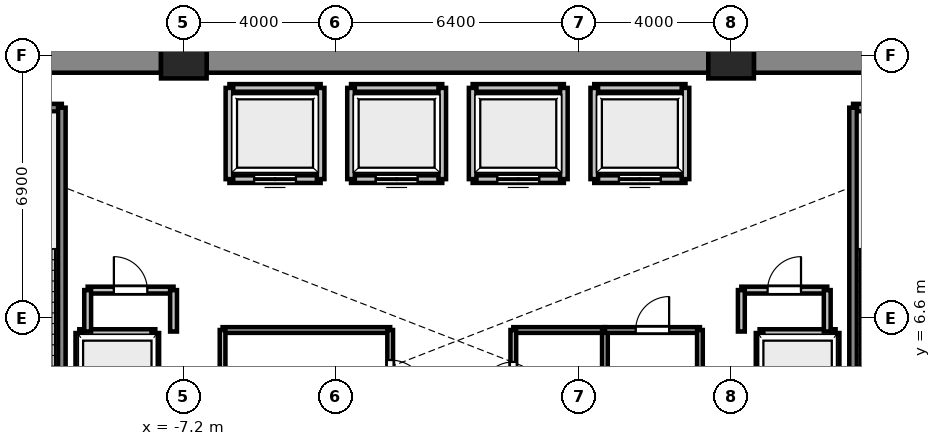
"""IFC4 building model, lengths in metres.
Left out: names, types, materials, properties, quantities, classifications, styles, units other than length and angle.
Written with IfcOpenShell. Run it as: python <this file> out.ifc"""

import sys

from ifc_helpers import new_model, si_unit, direction, frame, frame_2d, origin, origin_2d, place, context, subcontext, project, spatial, rectangle, extrude, source, transform, mapped, element, fill, save


model = new_model("IFC4")
c1 = context("Model", 3, precision=1e-05, world=origin(), true_north=direction((0.0, 1.0)))
c2 = subcontext(c1, "Body", "Model", "MODEL_VIEW")
j1 = project(units=[si_unit("LENGTHUNIT", "METRE"), si_unit("PLANEANGLEUNIT", "RADIAN")], contexts=[c1])
p1 = place(None, origin())
s1 = spatial("IfcSite", under=j1, at=p1, CompositionType="ELEMENT")
p2 = place(p1, origin())
s2 = spatial("IfcBuilding", under=s1, at=p2, CompositionType="ELEMENT")
p3 = place(p2, frame((0.0, 0.0, -13.2)))
s3 = spatial("IfcBuildingStorey", under=s2, at=p3, CompositionType="ELEMENT", Elevation=-13.2)
for number, where, z_axis, x_axis in (
    (1, (-7.2, 13.5, 0.0), (0.0, 0.0, 1.0), (1.0, 0.0, 0.0)),
    (2, (7.2, 13.5, 0.0), (0.0, 0.0, 1.0), (1.0, 0.0, 0.0)),
):
    element("IfcColumn", number, at=place(p3, frame(where, z_axis=z_axis, x_axis=x_axis)), inside=s3, PredefinedType="COLUMN", context=c2, shape_type="SweptSolid", body=[
        extrude(rectangle(XDim=1.2, YDim=1.2, at=origin_2d()), origin(), (0.0, 0.0, 1.0), 4.4),
    ])
p4 = place(p3, frame((-13.8, 13.5, 0.0), z_axis=(0.0, 0.0, 1.0), x_axis=(1.0, 0.0, 0.0)))
e3 = element("IfcWall", 3, at=p4, inside=s3, PredefinedType="SHEAR", context=c2, shape_type="SweptSolid", body=[
    extrude(rectangle(XDim=6.0, YDim=0.9, at=frame_2d((3.0, 0.0))), origin(), (0.0, 0.0, 1.0), 4.12),
])
p5 = place(p3, frame((-6.6, 13.5, 0.0), z_axis=(0.0, 0.0, 1.0), x_axis=(1.0, 0.0, 0.0)))
e4 = element("IfcWall", 4, at=p5, inside=s3, PredefinedType="SHEAR", context=c2, shape_type="SweptSolid", body=[
    extrude(rectangle(XDim=13.2, YDim=0.9, at=frame_2d((6.6, 0.0))), origin(), (0.0, 0.0, 1.0), 4.12),
])
p6 = place(p3, frame((7.8, 13.5, 0.0), z_axis=(0.0, 0.0, 1.0), x_axis=(1.0, 0.0, 0.0)))
e5 = element("IfcWall", 5, at=p6, inside=s3, PredefinedType="SHEAR", context=c2, shape_type="SweptSolid", body=[
    extrude(rectangle(XDim=6.0, YDim=0.9, at=frame_2d((3.0, 0.0))), origin(), (0.0, 0.0, 1.0), 4.12),
])
p7 = place(p3, frame((-9.95, 6.2, 0.0), z_axis=(0.0, 0.0, 1.0), x_axis=(1.0, 0.0, 0.0)))
e6 = element("IfcWall", 6, at=p7, inside=s3, PredefinedType="SOLIDWALL", context=c2, shape_type="SweptSolid", body=[
    extrude(rectangle(XDim=2.0, YDim=0.2, at=frame_2d((1.0, 0.0))), origin(), (0.0, 0.0, 1.0), 4.12),
])
for number, where, z_axis, x_axis in (
    (7, (-9.95, 3.4, 0.0), (0.0, 0.0, 1.0), (0.0, 1.0, 0.0)),
    (8, (-7.95, 6.2, 0.0), (0.0, 0.0, 1.0), (0.0, -1.0, 0.0)),
):
    element("IfcWall", number, at=place(p3, frame(where, z_axis=z_axis, x_axis=x_axis)), inside=s3, PredefinedType="SOLIDWALL", context=c2, shape_type="SweptSolid", body=[
        extrude(rectangle(XDim=2.8, YDim=0.2, at=frame_2d((1.4, 0.0))), origin(), (0.0, 0.0, 1.0), 4.12),
    ])
p8 = place(p3, frame((7.95, 6.2, 0.0), z_axis=(0.0, 0.0, 1.0), x_axis=(1.0, 0.0, 0.0)))
e9 = element("IfcWall", 9, at=p8, inside=s3, PredefinedType="SOLIDWALL", context=c2, shape_type="SweptSolid", body=[
    extrude(rectangle(XDim=2.0, YDim=0.2, at=frame_2d((1.0, 0.0))), origin(), (0.0, 0.0, 1.0), 4.12),
])
for number, where, z_axis, x_axis in (
    (10, (7.95, 3.4, 0.0), (0.0, 0.0, 1.0), (0.0, 1.0, 0.0)),
    (11, (9.95, 6.2, 0.0), (0.0, 0.0, 1.0), (0.0, -1.0, 0.0)),
):
    element("IfcWall", number, at=place(p3, frame(where, z_axis=z_axis, x_axis=x_axis)), inside=s3, PredefinedType="SOLIDWALL", context=c2, shape_type="SweptSolid", body=[
        extrude(rectangle(XDim=2.8, YDim=0.2, at=frame_2d((1.4, 0.0))), origin(), (0.0, 0.0, 1.0), 4.12),
    ])
p9 = place(p3, frame((-3.6, 10.25, 0.0), z_axis=(0.0, 0.0, 1.0), x_axis=(-1.0, 0.0, 0.0)))
e12 = element("IfcWall", 12, at=p9, inside=s3, PredefinedType="SOLIDWALL", context=c2, shape_type="SweptSolid", body=[
    extrude(rectangle(XDim=2.4, YDim=0.2, at=frame_2d((1.2, 0.0))), origin(), (0.0, 0.0, 1.0), 4.12),
])
p10 = place(p9, frame((0.65, 0.0, 0.0)))
e13 = element("IfcOpeningElement", 13, at=p10, cuts=e12, PredefinedType="OPENING", context=c2, shape_type="SweptSolid", body=[
    extrude(rectangle(XDim=1.1, YDim=2.2, at=frame_2d((0.55, 1.1))), frame((0.0, 0.11, 0.0), z_axis=(0.0, -1.0, 0.0), x_axis=(1.0, 0.0, 0.0)), (0.0, 0.0, 1.0), 0.22),
])
for number, where, z_axis, x_axis in (
    (14, (-6.0, 12.65, 0.0), (0.0, 0.0, 1.0), (1.0, 0.0, 0.0)),
    (15, (-6.0, 10.25, 0.0), (0.0, 0.0, 1.0), (0.0, 1.0, 0.0)),
    (16, (-3.6, 12.65, 0.0), (0.0, 0.0, 1.0), (0.0, -1.0, 0.0)),
):
    element("IfcWall", number, at=place(p3, frame(where, z_axis=z_axis, x_axis=x_axis)), inside=s3, PredefinedType="SOLIDWALL", context=c2, shape_type="SweptSolid", body=[
        extrude(rectangle(XDim=2.4, YDim=0.2, at=frame_2d((1.2, 0.0))), origin(), (0.0, 0.0, 1.0), 4.12),
    ])
p11 = place(p3, frame((-0.4, 10.25, 0.0), z_axis=(0.0, 0.0, 1.0), x_axis=(-1.0, 0.0, 0.0)))
e17 = element("IfcWall", 17, at=p11, inside=s3, PredefinedType="SOLIDWALL", context=c2, shape_type="SweptSolid", body=[
    extrude(rectangle(XDim=2.4, YDim=0.2, at=frame_2d((1.2, 0.0))), origin(), (0.0, 0.0, 1.0), 4.12),
])
p12 = place(p11, frame((0.65, 0.0, 0.0)))
e18 = element("IfcOpeningElement", 18, at=p12, cuts=e17, PredefinedType="OPENING", context=c2, shape_type="SweptSolid", body=[
    extrude(rectangle(XDim=1.1, YDim=2.2, at=frame_2d((0.55, 1.1))), frame((0.0, 0.11, 0.0), z_axis=(0.0, -1.0, 0.0), x_axis=(1.0, 0.0, 0.0)), (0.0, 0.0, 1.0), 0.22),
])
p13 = place(p3, frame((-2.8, 12.65, 0.0), z_axis=(0.0, 0.0, 1.0), x_axis=(1.0, 0.0, 0.0)))
e19 = element("IfcWall", 19, at=p13, inside=s3, PredefinedType="SOLIDWALL", context=c2, shape_type="SweptSolid", body=[
    extrude(rectangle(XDim=2.4, YDim=0.2, at=frame_2d((1.2, 0.0))), origin(), (0.0, 0.0, 1.0), 4.12),
])
for number, where, z_axis, x_axis in (
    (20, (-2.8, 10.25, 0.0), (0.0, 0.0, 1.0), (0.0, 1.0, 0.0)),
    (21, (-0.4, 12.65, 0.0), (0.0, 0.0, 1.0), (0.0, -1.0, 0.0)),
):
    element("IfcWall", number, at=place(p3, frame(where, z_axis=z_axis, x_axis=x_axis)), inside=s3, PredefinedType="SOLIDWALL", context=c2, shape_type="SweptSolid", body=[
        extrude(rectangle(XDim=2.4, YDim=0.2, at=frame_2d((1.2, 0.0))), origin(), (0.0, 0.0, 1.0), 4.12),
    ])
p14 = place(p3, frame((2.8, 10.25, 0.0), z_axis=(0.0, 0.0, 1.0), x_axis=(-1.0, 0.0, 0.0)))
e22 = element("IfcWall", 22, at=p14, inside=s3, PredefinedType="SOLIDWALL", context=c2, shape_type="SweptSolid", body=[
    extrude(rectangle(XDim=2.4, YDim=0.2, at=frame_2d((1.2, 0.0))), origin(), (0.0, 0.0, 1.0), 4.12),
])
p15 = place(p14, frame((0.65, 0.0, 0.0)))
e23 = element("IfcOpeningElement", 23, at=p15, cuts=e22, PredefinedType="OPENING", context=c2, shape_type="SweptSolid", body=[
    extrude(rectangle(XDim=1.1, YDim=2.2, at=frame_2d((0.55, 1.1))), frame((0.0, 0.11, 0.0), z_axis=(0.0, -1.0, 0.0), x_axis=(1.0, 0.0, 0.0)), (0.0, 0.0, 1.0), 0.22),
])
p16 = place(p3, frame((0.4, 12.65, 0.0), z_axis=(0.0, 0.0, 1.0), x_axis=(1.0, 0.0, 0.0)))
e24 = element("IfcWall", 24, at=p16, inside=s3, PredefinedType="SOLIDWALL", context=c2, shape_type="SweptSolid", body=[
    extrude(rectangle(XDim=2.4, YDim=0.2, at=frame_2d((1.2, 0.0))), origin(), (0.0, 0.0, 1.0), 4.12),
])
for number, where, z_axis, x_axis in (
    (25, (0.4, 10.25, 0.0), (0.0, 0.0, 1.0), (0.0, 1.0, 0.0)),
    (26, (2.8, 12.65, 0.0), (0.0, 0.0, 1.0), (0.0, -1.0, 0.0)),
):
    element("IfcWall", number, at=place(p3, frame(where, z_axis=z_axis, x_axis=x_axis)), inside=s3, PredefinedType="SOLIDWALL", context=c2, shape_type="SweptSolid", body=[
        extrude(rectangle(XDim=2.4, YDim=0.2, at=frame_2d((1.2, 0.0))), origin(), (0.0, 0.0, 1.0), 4.12),
    ])
p17 = place(p3, frame((6.0, 10.25, 0.0), z_axis=(0.0, 0.0, 1.0), x_axis=(-1.0, 0.0, 0.0)))
e27 = element("IfcWall", 27, at=p17, inside=s3, PredefinedType="SOLIDWALL", context=c2, shape_type="SweptSolid", body=[
    extrude(rectangle(XDim=2.4, YDim=0.2, at=frame_2d((1.2, 0.0))), origin(), (0.0, 0.0, 1.0), 4.12),
])
p18 = place(p17, frame((0.65, 0.0, 0.0)))
e28 = element("IfcOpeningElement", 28, at=p18, cuts=e27, PredefinedType="OPENING", context=c2, shape_type="SweptSolid", body=[
    extrude(rectangle(XDim=1.1, YDim=2.2, at=frame_2d((0.55, 1.1))), frame((0.0, 0.11, 0.0), z_axis=(0.0, -1.0, 0.0), x_axis=(1.0, 0.0, 0.0)), (0.0, 0.0, 1.0), 0.22),
])
for number, where, z_axis, x_axis in (
    (29, (3.6, 12.65, 0.0), (0.0, 0.0, 1.0), (1.0, 0.0, 0.0)),
    (30, (3.6, 10.25, 0.0), (0.0, 0.0, 1.0), (0.0, 1.0, 0.0)),
    (31, (6.0, 12.65, 0.0), (0.0, 0.0, 1.0), (0.0, -1.0, 0.0)),
):
    element("IfcWall", number, at=place(p3, frame(where, z_axis=z_axis, x_axis=x_axis)), inside=s3, PredefinedType="SOLIDWALL", context=c2, shape_type="SweptSolid", body=[
        extrude(rectangle(XDim=2.4, YDim=0.2, at=frame_2d((1.2, 0.0))), origin(), (0.0, 0.0, 1.0), 4.12),
    ])
p19 = place(p3, frame((-13.93, 12.13, 0.0), z_axis=(0.0, 0.0, 1.0), x_axis=(1.0, 0.0, 0.0)))
e32 = element("IfcWall", 32, at=p19, inside=s3, PredefinedType="SOLIDWALL", context=c2, shape_type="SweptSolid", body=[
    extrude(rectangle(XDim=3.52, YDim=0.2, at=frame_2d((1.76, 0.0))), origin(), (0.0, 0.0, 1.0), 4.12),
])
p20 = place(p3, frame((-10.41, 12.13, 0.0), z_axis=(0.0, 0.0, 1.0), x_axis=(0.0, -1.0, 0.0)))
e33 = element("IfcWall", 33, at=p20, inside=s3, PredefinedType="SOLIDWALL", context=c2, shape_type="SweptSolid", body=[
    extrude(rectangle(XDim=8.84, YDim=0.2, at=frame_2d((4.42, 0.0))), origin(), (0.0, 0.0, 1.0), 4.12),
])
p21 = place(p3, frame((10.41, 12.13, 0.0), z_axis=(0.0, 0.0, 1.0), x_axis=(1.0, 0.0, 0.0)))
e34 = element("IfcWall", 34, at=p21, inside=s3, PredefinedType="SOLIDWALL", context=c2, shape_type="SweptSolid", body=[
    extrude(rectangle(XDim=3.52, YDim=0.2, at=frame_2d((1.76, 0.0))), origin(), (0.0, 0.0, 1.0), 4.12),
])
p22 = place(p3, frame((10.41, 3.29, 0.0), z_axis=(0.0, 0.0, 1.0), x_axis=(0.0, 1.0, 0.0)))
e35 = element("IfcWall", 35, at=p22, inside=s3, PredefinedType="SOLIDWALL", context=c2, shape_type="SweptSolid", body=[
    extrude(rectangle(XDim=8.84, YDim=0.2, at=frame_2d((4.42, 0.0))), origin(), (0.0, 0.0, 1.0), 4.12),
])
p23 = place(p3, frame((-9.73, 7.33, 0.0), z_axis=(0.0, 0.0, 1.0), x_axis=(1.0, 0.0, 0.0)))
e36 = element("IfcWall", 36, at=p23, inside=s3, PredefinedType="PARTITIONING", context=c2, shape_type="SweptSolid", body=[
    extrude(rectangle(XDim=2.26, YDim=0.18, at=frame_2d((1.13, 0.0))), origin(), (0.0, 0.0, 1.0), 3.41),
])
p24 = place(p23, frame((0.69, 0.0, 0.0)))
e37 = element("IfcOpeningElement", 37, at=p24, cuts=e36, PredefinedType="OPENING", context=c2, shape_type="SweptSolid", body=[
    extrude(rectangle(XDim=0.88, YDim=2.1, at=frame_2d((0.44, 1.05))), frame((0.0, 0.1, 0.0), z_axis=(0.0, -1.0, 0.0), x_axis=(1.0, 0.0, 0.0)), (0.0, 0.0, 1.0), 0.2),
])
p25 = place(p3, frame((-9.73, 6.24, 0.0), z_axis=(0.0, 0.0, 1.0), x_axis=(0.0, 1.0, 0.0)))
e38 = element("IfcWall", 38, at=p25, inside=s3, PredefinedType="PARTITIONING", context=c2, shape_type="SweptSolid", body=[
    extrude(rectangle(XDim=1.09, YDim=0.18, at=frame_2d((0.545, 0.0))), origin(), (0.0, 0.0, 1.0), 4.12),
])
p26 = place(p3, frame((-7.47, 7.33, 0.0), z_axis=(0.0, 0.0, 1.0), x_axis=(0.0, -1.0, 0.0)))
e39 = element("IfcWall", 39, at=p26, inside=s3, PredefinedType="PARTITIONING", context=c2, shape_type="SweptSolid", body=[
    extrude(rectangle(XDim=1.09, YDim=0.18, at=frame_2d((0.545, 0.0))), origin(), (0.0, 0.0, 1.0), 3.41),
])
p27 = place(p3, frame((7.47, 7.33, 0.0), z_axis=(0.0, 0.0, 1.0), x_axis=(1.0, 0.0, 0.0)))
e40 = element("IfcWall", 40, at=p27, inside=s3, PredefinedType="PARTITIONING", context=c2, shape_type="SweptSolid", body=[
    extrude(rectangle(XDim=2.26, YDim=0.18, at=frame_2d((1.13, 0.0))), origin(), (0.0, 0.0, 1.0), 3.41),
])
p28 = place(p27, frame((0.69, 0.0, 0.0)))
e41 = element("IfcOpeningElement", 41, at=p28, cuts=e40, PredefinedType="OPENING", context=c2, shape_type="SweptSolid", body=[
    extrude(rectangle(XDim=0.88, YDim=2.1, at=frame_2d((0.44, 1.05))), frame((0.0, 0.1, 0.0), z_axis=(0.0, -1.0, 0.0), x_axis=(1.0, 0.0, 0.0)), (0.0, 0.0, 1.0), 0.2),
])
p29 = place(p3, frame((7.47, 6.24, 0.0), z_axis=(0.0, 0.0, 1.0), x_axis=(0.0, 1.0, 0.0)))
e42 = element("IfcWall", 42, at=p29, inside=s3, PredefinedType="PARTITIONING", context=c2, shape_type="SweptSolid", body=[
    extrude(rectangle(XDim=1.09, YDim=0.18, at=frame_2d((0.545, 0.0))), origin(), (0.0, 0.0, 1.0), 3.41),
])
p30 = place(p3, frame((9.73, 7.33, 0.0), z_axis=(0.0, 0.0, 1.0), x_axis=(0.0, -1.0, 0.0)))
e43 = element("IfcWall", 43, at=p30, inside=s3, PredefinedType="PARTITIONING", context=c2, shape_type="SweptSolid", body=[
    extrude(rectangle(XDim=1.09, YDim=0.18, at=frame_2d((0.545, 0.0))), origin(), (0.0, 0.0, 1.0), 4.12),
])
p31 = place(p3, frame((-6.18, 6.28, 0.0), z_axis=(0.0, 0.0, 1.0), x_axis=(1.0, 0.0, 0.0)))
e44 = element("IfcWall", 44, at=p31, inside=s3, PredefinedType="PARTITIONING", context=c2, shape_type="SweptSolid", body=[
    extrude(rectangle(XDim=4.41, YDim=0.15, at=frame_2d((2.205, 0.0))), origin(), (0.0, 0.0, 1.0), 4.12),
])
p32 = place(p3, frame((-6.18, 3.76, 0.0), z_axis=(0.0, 0.0, 1.0), x_axis=(0.0, 1.0, 0.0)))
e45 = element("IfcWall", 45, at=p32, inside=s3, PredefinedType="PARTITIONING", context=c2, shape_type="SweptSolid", body=[
    extrude(rectangle(XDim=2.52, YDim=0.15, at=frame_2d((1.26, 0.0))), origin(), (0.0, 0.0, 1.0), 4.12),
])
p33 = place(p3, frame((-1.77, 6.28, 0.0), z_axis=(0.0, 0.0, 1.0), x_axis=(0.0, -1.0, 0.0)))
e46 = element("IfcWall", 46, at=p33, inside=s3, PredefinedType="PARTITIONING", context=c2, shape_type="SweptSolid", body=[
    extrude(rectangle(XDim=2.52, YDim=0.15, at=frame_2d((1.26, 0.0))), origin(), (0.0, 0.0, 1.0), 4.12),
])
p34 = place(p33, frame((0.79, 0.0, 0.0)))
e47 = element("IfcOpeningElement", 47, at=p34, cuts=e46, PredefinedType="OPENING", context=c2, shape_type="SweptSolid", body=[
    extrude(rectangle(XDim=0.98, YDim=2.15, at=frame_2d((0.49, 1.075))), frame((0.0, 0.085, 0.0), z_axis=(0.0, -1.0, 0.0), x_axis=(1.0, 0.0, 0.0)), (0.0, 0.0, 1.0), 0.17),
])
p35 = place(p3, frame((1.47, 6.28, 0.0), z_axis=(0.0, 0.0, 1.0), x_axis=(1.0, 0.0, 0.0)))
e48 = element("IfcWall", 48, at=p35, inside=s3, PredefinedType="PARTITIONING", context=c2, shape_type="SweptSolid", body=[
    extrude(rectangle(XDim=2.41, YDim=0.15, at=frame_2d((1.205, 0.0))), origin(), (0.0, 0.0, 1.0), 4.12),
])
p36 = place(p3, frame((1.47, 3.76, 0.0), z_axis=(0.0, 0.0, 1.0), x_axis=(0.0, 1.0, 0.0)))
e49 = element("IfcWall", 49, at=p36, inside=s3, PredefinedType="PARTITIONING", context=c2, shape_type="SweptSolid", body=[
    extrude(rectangle(XDim=2.52, YDim=0.15, at=frame_2d((1.26, 0.0))), origin(), (0.0, 0.0, 1.0), 4.12),
])
p37 = place(p36, frame((0.8, 0.0, 0.0)))
e50 = element("IfcOpeningElement", 50, at=p37, cuts=e49, PredefinedType="OPENING", context=c2, shape_type="SweptSolid", body=[
    extrude(rectangle(XDim=0.88, YDim=2.1, at=frame_2d((0.44, 1.05))), frame((0.0, 0.085, 0.0), z_axis=(0.0, -1.0, 0.0), x_axis=(1.0, 0.0, 0.0)), (0.0, 0.0, 1.0), 0.17),
])
p38 = place(p3, frame((3.88, 6.28, 0.0), z_axis=(0.0, 0.0, 1.0), x_axis=(0.0, -1.0, 0.0)))
e51 = element("IfcWall", 51, at=p38, inside=s3, PredefinedType="PARTITIONING", context=c2, shape_type="SweptSolid", body=[
    extrude(rectangle(XDim=2.52, YDim=0.15, at=frame_2d((1.26, 0.0))), origin(), (0.0, 0.0, 1.0), 4.12),
])
p39 = place(p3, frame((3.88, 6.28, 0.0), z_axis=(0.0, 0.0, 1.0), x_axis=(1.0, 0.0, 0.0)))
e52 = element("IfcWall", 52, at=p39, inside=s3, PredefinedType="PARTITIONING", context=c2, shape_type="SweptSolid", body=[
    extrude(rectangle(XDim=2.5, YDim=0.15, at=frame_2d((1.25, 0.0))), origin(), (0.0, 0.0, 1.0), 4.12),
])
p40 = place(p39, frame((0.81, 0.0, 0.0)))
e53 = element("IfcOpeningElement", 53, at=p40, cuts=e52, PredefinedType="OPENING", context=c2, shape_type="SweptSolid", body=[
    extrude(rectangle(XDim=0.88, YDim=2.15, at=frame_2d((0.44, 1.075))), frame((0.0, 0.085, 0.0), z_axis=(0.0, -1.0, 0.0), x_axis=(1.0, 0.0, 0.0)), (0.0, 0.0, 1.0), 0.17),
])
p41 = place(p3, frame((6.38, 6.28, 0.0), z_axis=(0.0, 0.0, 1.0), x_axis=(0.0, -1.0, 0.0)))
e54 = element("IfcWall", 54, at=p41, inside=s3, PredefinedType="PARTITIONING", context=c2, shape_type="SweptSolid", body=[
    extrude(rectangle(XDim=2.52, YDim=0.15, at=frame_2d((1.26, 0.0))), origin(), (0.0, 0.0, 1.0), 4.12),
])
m1 = source(origin(), c2, "Body", "SweptSolid", [
    extrude(rectangle(XDim=1.1, YDim=2.2, at=frame_2d((0.55, 1.1))), frame((0.0, 0.025, 0.0), z_axis=(0.0, -1.0, 0.0), x_axis=(1.0, 0.0, 0.0)), (0.0, 0.0, 1.0), 0.05),
])
p42 = place(p10, origin())
e55 = element("IfcDoor", 55, at=p42, inside=s3, OperationType="DOUBLE_DOOR_SLIDING", PredefinedType="DOOR", context=c2, shape_type="MappedRepresentation", body=[
    mapped(m1, transform((0.0, 0.0, 0.0), x_axis=(1.0, 0.0, 0.0), y_axis=(0.0, 1.0, 0.0), z_axis=(0.0, 0.0, 1.0), scale=1.0)),
])
fill(e13, e55)
p43 = place(p12, origin())
e56 = element("IfcDoor", 56, at=p43, inside=s3, OperationType="DOUBLE_DOOR_SLIDING", PredefinedType="DOOR", context=c2, shape_type="MappedRepresentation", body=[
    mapped(m1, transform((0.0, 0.0, 0.0), x_axis=(1.0, 0.0, 0.0), y_axis=(0.0, 1.0, 0.0), z_axis=(0.0, 0.0, 1.0), scale=1.0)),
])
fill(e18, e56)
p44 = place(p15, origin())
e57 = element("IfcDoor", 57, at=p44, inside=s3, OperationType="DOUBLE_DOOR_SLIDING", PredefinedType="DOOR", context=c2, shape_type="MappedRepresentation", body=[
    mapped(m1, transform((0.0, 0.0, 0.0), x_axis=(1.0, 0.0, 0.0), y_axis=(0.0, 1.0, 0.0), z_axis=(0.0, 0.0, 1.0), scale=1.0)),
])
fill(e23, e57)
p45 = place(p18, origin())
e58 = element("IfcDoor", 58, at=p45, inside=s3, OperationType="DOUBLE_DOOR_SLIDING", PredefinedType="DOOR", context=c2, shape_type="MappedRepresentation", body=[
    mapped(m1, transform((0.0, 0.0, 0.0), x_axis=(1.0, 0.0, 0.0), y_axis=(0.0, 1.0, 0.0), z_axis=(0.0, 0.0, 1.0), scale=1.0)),
])
fill(e28, e58)
m2 = source(origin(), c2, "Body", "SweptSolid", [
    extrude(rectangle(XDim=0.98, YDim=2.15, at=frame_2d((0.49, 1.075))), frame((0.0, 0.025, 0.0), z_axis=(0.0, -1.0, 0.0), x_axis=(1.0, 0.0, 0.0)), (0.0, 0.0, 1.0), 0.05),
])
p46 = place(p34, origin())
e59 = element("IfcDoor", 59, at=p46, inside=s3, OperationType="SINGLE_SWING_RIGHT", PredefinedType="DOOR", context=c2, shape_type="MappedRepresentation", body=[
    mapped(m2, transform((0.0, 0.0, 0.0), x_axis=(1.0, 0.0, 0.0), y_axis=(0.0, 1.0, 0.0), z_axis=(0.0, 0.0, 1.0), scale=1.0)),
])
fill(e47, e59)
m3 = source(origin(), c2, "Body", "SweptSolid", [
    extrude(rectangle(XDim=0.88, YDim=2.1, at=frame_2d((0.44, 1.05))), frame((0.0, 0.025, 0.0), z_axis=(0.0, -1.0, 0.0), x_axis=(1.0, 0.0, 0.0)), (0.0, 0.0, 1.0), 0.05),
])
p47 = place(p37, origin())
e60 = element("IfcDoor", 60, at=p47, inside=s3, OperationType="SINGLE_SWING_LEFT", PredefinedType="DOOR", context=c2, shape_type="MappedRepresentation", body=[
    mapped(m3, transform((0.0, 0.0, 0.0), x_axis=(1.0, 0.0, 0.0), y_axis=(0.0, 1.0, 0.0), z_axis=(0.0, 0.0, 1.0), scale=1.0)),
])
fill(e50, e60)
m4 = source(origin(), c2, "Body", "SweptSolid", [
    extrude(rectangle(XDim=0.88, YDim=2.15, at=frame_2d((0.44, 1.075))), frame((0.0, 0.025, 0.0), z_axis=(0.0, -1.0, 0.0), x_axis=(1.0, 0.0, 0.0)), (0.0, 0.0, 1.0), 0.05),
])
p48 = place(p40, origin())
e61 = element("IfcDoor", 61, at=p48, inside=s3, OperationType="SINGLE_SWING_RIGHT", PredefinedType="DOOR", context=c2, shape_type="MappedRepresentation", body=[
    mapped(m4, transform((0.0, 0.0, 0.0), x_axis=(1.0, 0.0, 0.0), y_axis=(0.0, 1.0, 0.0), z_axis=(0.0, 0.0, 1.0), scale=1.0)),
])
fill(e53, e61)
p49 = place(p24, origin())
e62 = element("IfcDoor", 62, at=p49, inside=s3, OperationType="SINGLE_SWING_LEFT", PredefinedType="DOOR", context=c2, shape_type="MappedRepresentation", body=[
    mapped(m3, transform((0.0, 0.0, 0.0), x_axis=(1.0, 0.0, 0.0), y_axis=(0.0, 1.0, 0.0), z_axis=(0.0, 0.0, 1.0), scale=1.0)),
])
fill(e37, e62)
p50 = place(p28, origin())
e63 = element("IfcDoor", 63, at=p50, inside=s3, OperationType="SINGLE_SWING_RIGHT", PredefinedType="DOOR", context=c2, shape_type="MappedRepresentation", body=[
    mapped(m3, transform((0.0, 0.0, 0.0), x_axis=(1.0, 0.0, 0.0), y_axis=(0.0, 1.0, 0.0), z_axis=(0.0, 0.0, 1.0), scale=1.0)),
])
fill(e41, e63)
save(model, sys.argv[1])
